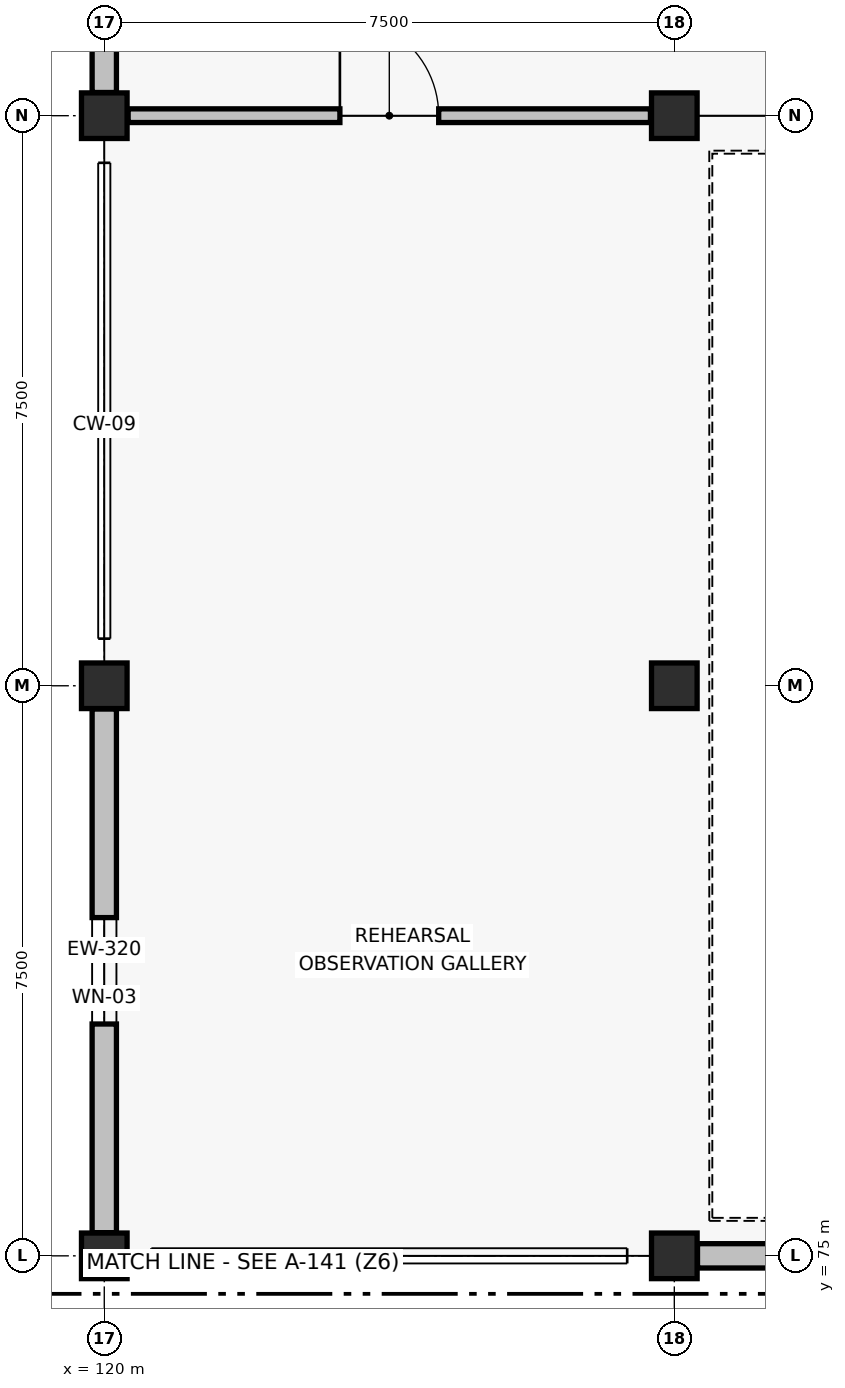
"""IFC4 building model, lengths in metres.
Left out: names, types, materials, properties, quantities, classifications, styles, units other than length and angle.
Written with IfcOpenShell. Run it as: python <this file> out.ifc"""

import sys

from ifc_helpers import new_model, si_unit, direction, frame, frame_2d, origin, origin_2d, place, context, subcontext, project, spatial, rectangle, extrude, element, fill, save


model = new_model("IFC4")
c1 = context("Model", 3, precision=1e-05, world=origin(), true_north=direction((0.0, 1.0)))
c2 = subcontext(c1, "Body", "Model", "MODEL_VIEW")
j1 = project(units=[si_unit("LENGTHUNIT", "METRE"), si_unit("PLANEANGLEUNIT", "RADIAN")], contexts=[c1])
p1 = place(None, origin())
s1 = spatial("IfcSite", under=j1, at=p1, CompositionType="ELEMENT")
p2 = place(p1, origin())
s2 = spatial("IfcBuilding", under=s1, at=p2, CompositionType="ELEMENT")
p3 = place(p2, frame((0.0, 0.0, 9.0)))
s3 = spatial("IfcBuildingStorey", under=s2, at=p3, CompositionType="ELEMENT", Elevation=9.0)
for number, where, z_axis, x_axis in (
    (1, (120.0, 75.0, 0.0), (0.0, 0.0, 1.0), (1.0, 0.0, 0.0)),
    (2, (120.0, 82.5, 0.0), (0.0, 0.0, 1.0), (1.0, 0.0, 0.0)),
    (3, (120.0, 90.0, 0.0), (0.0, 0.0, 1.0), (1.0, 0.0, 0.0)),
    (4, (127.5, 75.0, 0.0), (0.0, 0.0, 1.0), (1.0, 0.0, 0.0)),
    (5, (127.5, 82.5, 0.0), (0.0, 0.0, 1.0), (1.0, 0.0, 0.0)),
    (6, (127.5, 90.0, 0.0), (0.0, 0.0, 1.0), (1.0, 0.0, 0.0)),
):
    element("IfcColumn", number, at=place(p3, frame(where, z_axis=z_axis, x_axis=x_axis)), inside=s3, PredefinedType="COLUMN", context=c2, shape_type="SweptSolid", body=[
        extrude(rectangle(XDim=0.6, YDim=0.6, at=origin_2d()), origin(), (0.0, 0.0, 1.0), 4.2),
    ])
p4 = place(p3, frame((127.805, 75.0, 0.0), z_axis=(0.0, 0.0, 1.0), x_axis=(1.0, 0.0, 0.0)))
e7 = element("IfcWall", 7, at=p4, inside=s3, PredefinedType="SOLIDWALL", context=c2, shape_type="SweptSolid", body=[
    extrude(rectangle(XDim=6.88, YDim=0.32, at=frame_2d((3.44, 0.0))), origin(), (0.0, 0.0, 1.0), 2.87),
])
p5 = place(p4, frame((2.37, 0.0, 0.6)))
e8 = element("IfcOpeningElement", 8, at=p5, cuts=e7, PredefinedType="OPENING", context=c2, shape_type="SweptSolid", body=[
    extrude(rectangle(XDim=2.15, YDim=1.45, at=frame_2d((1.075, 0.725))), frame((0.0, 0.17, 0.0), z_axis=(0.0, -1.0, 0.0), x_axis=(1.0, 0.0, 0.0)), (0.0, 0.0, 1.0), 0.34),
])
p6 = place(p3, frame((120.0, 75.305, 0.0), z_axis=(0.0, 0.0, 1.0), x_axis=(0.0, 1.0, 0.0)))
e9 = element("IfcWall", 9, at=p6, inside=s3, PredefinedType="SOLIDWALL", context=c2, shape_type="SweptSolid", body=[
    extrude(rectangle(XDim=6.89, YDim=0.32, at=frame_2d((3.445, 0.0))), origin(), (0.0, 0.0, 1.0), 2.97),
])
p7 = place(p6, frame((2.745, 0.0, 0.6)))
e10 = element("IfcOpeningElement", 10, at=p7, cuts=e9, PredefinedType="OPENING", context=c2, shape_type="SweptSolid", body=[
    extrude(rectangle(XDim=1.4, YDim=1.8, at=frame_2d((0.7, 0.9))), frame((0.0, 0.17, 0.0), z_axis=(0.0, -1.0, 0.0), x_axis=(1.0, 0.0, 0.0)), (0.0, 0.0, 1.0), 0.34),
])
p8 = place(p3, frame((120.0, 90.305, 0.0), z_axis=(0.0, 0.0, 1.0), x_axis=(0.0, 1.0, 0.0)))
e11 = element("IfcWall", 11, at=p8, inside=s3, PredefinedType="SOLIDWALL", context=c2, shape_type="SweptSolid", body=[
    extrude(rectangle(XDim=6.89, YDim=0.32, at=frame_2d((3.445, 0.0))), origin(), (0.0, 0.0, 1.0), 2.82),
])
p9 = place(p8, frame((2.595, 0.0, 0.6)))
e12 = element("IfcOpeningElement", 12, at=p9, cuts=e11, PredefinedType="OPENING", context=c2, shape_type="SweptSolid", body=[
    extrude(rectangle(XDim=1.7, YDim=1.8, at=frame_2d((0.85, 0.9))), frame((0.0, 0.17, 0.0), z_axis=(0.0, -1.0, 0.0), x_axis=(1.0, 0.0, 0.0)), (0.0, 0.0, 1.0), 0.34),
])
p10 = place(p3, frame((120.314, 90.0, 0.0), z_axis=(0.0, 0.0, 1.0), x_axis=(1.0, 0.0, 0.0)))
e13 = element("IfcWall", 13, at=p10, inside=s3, PredefinedType="PARTITIONING", context=c2, shape_type="SweptSolid", body=[
    extrude(rectangle(XDim=6.872, YDim=0.18, at=frame_2d((3.436, 0.0))), origin(), (0.0, 0.0, 1.0), 2.92),
])
p11 = place(p10, frame((2.786, 0.0, 0.0)))
e14 = element("IfcOpeningElement", 14, at=p11, cuts=e13, PredefinedType="OPENING", context=c2, shape_type="SweptSolid", body=[
    extrude(rectangle(XDim=1.3, YDim=2.15, at=frame_2d((0.65, 1.075))), frame((0.0, 0.1, 0.0), z_axis=(0.0, -1.0, 0.0), x_axis=(1.0, 0.0, 0.0)), (0.0, 0.0, 1.0), 0.2),
])
p12 = place(p7, origin())
e15 = element("IfcWindow", 15, at=p12, inside=s3, PartitioningType="SINGLE_PANEL", PredefinedType="WINDOW", context=c2, shape_type="SweptSolid", body=[
    extrude(rectangle(XDim=1.4, YDim=1.8, at=frame_2d((0.7, 0.9))), frame((0.0, 0.03, 0.0), z_axis=(0.0, -1.0, 0.0), x_axis=(1.0, 0.0, 0.0)), (0.0, 0.0, 1.0), 0.06),
])
fill(e10, e15)
p13 = place(p11, origin())
e16 = element("IfcDoor", 16, at=p13, inside=s3, OperationType="SINGLE_SWING_LEFT", PredefinedType="DOOR", context=c2, shape_type="SweptSolid", body=[
    extrude(rectangle(XDim=1.3, YDim=2.15, at=frame_2d((0.65, 1.075))), frame((0.0, 0.025, 0.0), z_axis=(0.0, -1.0, 0.0), x_axis=(1.0, 0.0, 0.0)), (0.0, 0.0, 1.0), 0.05),
])
fill(e14, e16)
save(model, sys.argv[1])
